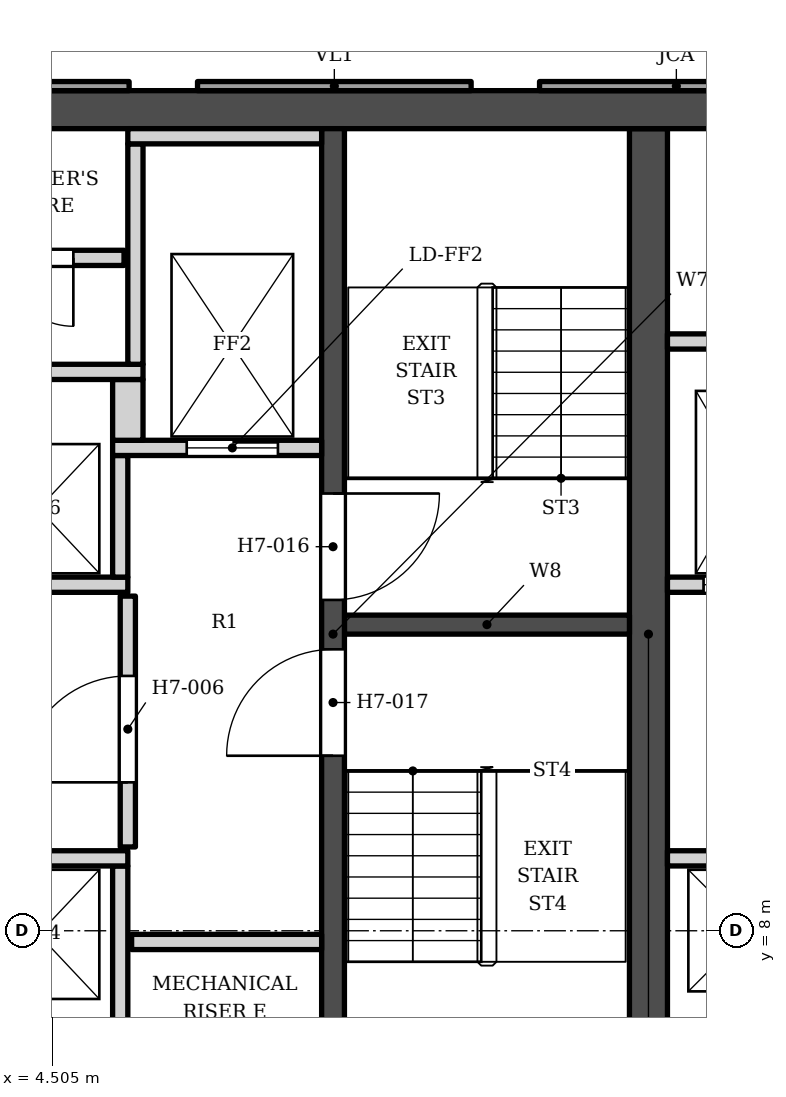
"""IFC4 building model, lengths in metres.
Left out: names, types, materials, properties, quantities, classifications, styles, units other than length and angle.
Written with IfcOpenShell. Run it as: python <this file> out.ifc"""

import sys

from ifc_helpers import new_model, si_unit, direction, frame, frame_2d, origin, place, context, subcontext, project, spatial, polyline, rectangle, outline, extrude, element, fill, save


model = new_model("IFC4")
c1 = context("Model", 3, precision=1e-05, world=origin(), true_north=direction((0.0, 1.0)))
c2 = subcontext(c1, "Body", "Model", "MODEL_VIEW")
j1 = project(units=[si_unit("LENGTHUNIT", "METRE"), si_unit("PLANEANGLEUNIT", "RADIAN")], contexts=[c1])
p1 = place(None, origin())
s1 = spatial("IfcSite", under=j1, at=p1, CompositionType="ELEMENT")
p2 = place(p1, origin())
s2 = spatial("IfcBuilding", under=s1, at=p2, CompositionType="ELEMENT")
p3 = place(p2, frame((0.0, 0.0, 112.2)))
s3 = spatial("IfcBuildingStorey", under=s2, at=p3, CompositionType="ELEMENT", Elevation=112.2)
p4 = place(p3, frame((-16.9, 18.802, 0.0), z_axis=(0.0, 0.0, 1.0), x_axis=(1.0, 0.0, 0.0)))
e1 = element("IfcWall", 1, at=p4, inside=s3, PredefinedType="SHEAR", context=c2, shape_type="SweptSolid", body=[
    extrude(rectangle(XDim=33.8, YDim=0.5, at=frame_2d((16.9, 0.0))), origin(), (0.0, 0.0, 1.0), 3.4),
])
p5 = place(p3, frame((12.35, 5.253, 0.0), z_axis=(0.0, 0.0, 1.0), x_axis=(0.0, 1.0, 0.0)))
e2 = element("IfcWall", 2, at=p5, inside=s3, PredefinedType="SHEAR", context=c2, shape_type="SweptSolid", body=[
    extrude(rectangle(XDim=13.3, YDim=0.5, at=frame_2d((6.65, 0.0))), origin(), (0.0, 0.0, 1.0), 3.4),
])
p6 = place(p3, frame((8.2, 5.253, 0.0), z_axis=(0.0, 0.0, 1.0), x_axis=(0.0, 1.0, 0.0)))
e3 = element("IfcWall", 3, at=p6, inside=s3, PredefinedType="SHEAR", context=c2, shape_type="SweptSolid", body=[
    extrude(rectangle(XDim=13.3, YDim=0.3, at=frame_2d((6.65, 0.0))), origin(), (0.0, 0.0, 1.0), 3.4),
])
p7 = place(p6, frame((7.1, 0.0, 0.0)))
e4 = element("IfcOpeningElement", 4, at=p7, cuts=e3, PredefinedType="OPENING", context=c2, shape_type="SweptSolid", body=[
    extrude(rectangle(XDim=1.4, YDim=2.1, at=frame_2d((0.7, 1.05))), frame((0.0, 0.16, 0.0), z_axis=(0.0, -1.0, 0.0), x_axis=(1.0, 0.0, 0.0)), (0.0, 0.0, 1.0), 0.32),
])
p8 = place(p6, frame((5.05, 0.0, 0.0)))
e5 = element("IfcOpeningElement", 5, at=p8, cuts=e3, PredefinedType="OPENING", context=c2, shape_type="SweptSolid", body=[
    extrude(rectangle(XDim=1.4, YDim=2.1, at=frame_2d((0.7, 1.05))), frame((0.0, 0.16, 0.0), z_axis=(0.0, -1.0, 0.0), x_axis=(1.0, 0.0, 0.0)), (0.0, 0.0, 1.0), 0.32),
])
p9 = place(p3, frame((8.35, 12.028, 0.0), z_axis=(0.0, 0.0, 1.0), x_axis=(1.0, 0.0, 0.0)))
e6 = element("IfcWall", 6, at=p9, inside=s3, PredefinedType="SHEAR", context=c2, shape_type="SweptSolid", body=[
    extrude(rectangle(XDim=3.75, YDim=0.25, at=frame_2d((1.875, 0.0))), origin(), (0.0, 0.0, 1.0), 3.4),
])
p10 = place(p3, origin())
e7 = element("IfcWall", 7, at=p10, inside=s3, PredefinedType="SOLIDWALL", context=c2, shape_type="SweptSolid", body=[
    extrude(outline(polyline([(10.917, 19.173), (10.917, 19.052), (14.517, 19.052), (14.517, 19.173), (10.917, 19.173)])), origin(), (0.0, 0.0, 1.0), 2.65),
])
p11 = place(p3, origin())
e8 = element("IfcWall", 8, at=p11, inside=s3, PredefinedType="ELEMENTEDWALL", context=c2, shape_type="SweptSolid", body=[
    extrude(outline(polyline([(6.417, 19.173), (6.417, 19.052), (10.017, 19.052), (10.017, 19.173), (6.417, 19.173)])), origin(), (0.0, 0.0, 1.0), 2.65),
])
p12 = place(p3, origin())
e9 = element("IfcWall", 9, at=p12, inside=s3, PredefinedType="SOLIDWALL", context=c2, shape_type="SweptSolid", body=[
    extrude(outline(polyline([(1.917, 19.173), (1.917, 19.052), (5.517, 19.052), (5.517, 19.173), (1.917, 19.173)])), origin(), (0.0, 0.0, 1.0), 2.65),
])
for number, where, z_axis, x_axis in (
    (10, (5.4, 6.353, 0.0), (0.0, 0.0, 1.0), (0.0, 1.0, 0.0)),
    (11, (5.55, 7.853, 0.0), (0.0, 0.0, 1.0), (1.0, 0.0, 0.0)),
):
    element("IfcWall", number, at=place(p3, frame(where, z_axis=z_axis, x_axis=x_axis)), inside=s3, PredefinedType="SOLIDWALL", context=c2, shape_type="SweptSolid", body=[
        extrude(rectangle(XDim=2.5, YDim=0.2, at=frame_2d((1.25, 0.0))), origin(), (0.0, 0.0, 1.0), 3.23),
    ])
p13 = place(p3, frame((1.0, 8.953, 0.0), z_axis=(0.0, 0.0, 1.0), x_axis=(1.0, 0.0, 0.0)))
e12 = element("IfcWall", 12, at=p13, inside=s3, PredefinedType="SOLIDWALL", context=c2, shape_type="SweptSolid", body=[
    extrude(rectangle(XDim=4.5, YDim=0.2, at=frame_2d((2.25, 0.0))), origin(), (0.0, 0.0, 1.0), 3.23),
])
p14 = place(p3, frame((12.6, 8.953, 0.0), z_axis=(0.0, 0.0, 1.0), x_axis=(1.0, 0.0, 0.0)))
e13 = element("IfcWall", 13, at=p14, inside=s3, PredefinedType="SOLIDWALL", context=c2, shape_type="SweptSolid", body=[
    extrude(rectangle(XDim=4.3, YDim=0.2, at=frame_2d((2.15, 0.0))), origin(), (0.0, 0.0, 1.0), 3.23),
])
p15 = place(p14, frame((0.525, 0.0, 0.0)))
e14 = element("IfcOpeningElement", 14, at=p15, cuts=e13, PredefinedType="OPENING", context=c2, shape_type="SweptSolid", body=[
    extrude(rectangle(XDim=1.1, YDim=2.1, at=frame_2d((0.55, 1.05))), frame((0.0, 0.11, 0.0), z_axis=(0.0, -1.0, 0.0), x_axis=(1.0, 0.0, 0.0)), (0.0, 0.0, 1.0), 0.22),
])
p16 = place(p14, frame((2.775, 0.0, 0.0)))
e15 = element("IfcOpeningElement", 15, at=p16, cuts=e13, PredefinedType="OPENING", context=c2, shape_type="SweptSolid", body=[
    extrude(rectangle(XDim=1.1, YDim=2.1, at=frame_2d((0.55, 1.05))), frame((0.0, 0.11, 0.0), z_axis=(0.0, -1.0, 0.0), x_axis=(1.0, 0.0, 0.0)), (0.0, 0.0, 1.0), 0.22),
])
p17 = place(p3, frame((5.5, 9.103, 0.0), z_axis=(0.0, 0.0, 1.0), x_axis=(0.0, 1.0, 0.0)))
e16 = element("IfcWall", 16, at=p17, inside=s3, PredefinedType="SOLIDWALL", context=c2, shape_type="SweptSolid", body=[
    extrude(rectangle(XDim=3.3, YDim=0.2, at=frame_2d((1.65, 0.0))), origin(), (0.0, 0.0, 1.0), 3.23),
])
p18 = place(p17, frame((0.85, 0.0, 0.0)))
e17 = element("IfcOpeningElement", 17, at=p18, cuts=e16, PredefinedType="OPENING", context=c2, shape_type="SweptSolid", body=[
    extrude(rectangle(XDim=1.4, YDim=2.1, at=frame_2d((0.7, 1.05))), frame((0.0, 0.11, 0.0), z_axis=(0.0, -1.0, 0.0), x_axis=(1.0, 0.0, 0.0)), (0.0, 0.0, 1.0), 0.22),
])
p19 = place(p3, frame((-1.5, 12.552, 0.0), z_axis=(0.0, 0.0, 1.0), x_axis=(1.0, 0.0, 0.0)))
e18 = element("IfcWall", 18, at=p19, inside=s3, PredefinedType="SOLIDWALL", context=c2, shape_type="SweptSolid", body=[
    extrude(rectangle(XDim=7.0, YDim=0.2, at=frame_2d((3.5, 0.0))), origin(), (0.0, 0.0, 1.0), 3.23),
])
p20 = place(p3, frame((12.6, 12.552, 0.0), z_axis=(0.0, 0.0, 1.0), x_axis=(1.0, 0.0, 0.0)))
e19 = element("IfcWall", 19, at=p20, inside=s3, PredefinedType="SOLIDWALL", context=c2, shape_type="SweptSolid", body=[
    extrude(rectangle(XDim=4.3, YDim=0.2, at=frame_2d((2.15, 0.0))), origin(), (0.0, 0.0, 1.0), 3.23),
])
p21 = place(p20, frame((0.475, 0.0, 0.0)))
e20 = element("IfcOpeningElement", 20, at=p21, cuts=e19, PredefinedType="OPENING", context=c2, shape_type="SweptSolid", body=[
    extrude(rectangle(XDim=1.2, YDim=2.1, at=frame_2d((0.6, 1.05))), frame((0.0, 0.11, 0.0), z_axis=(0.0, -1.0, 0.0), x_axis=(1.0, 0.0, 0.0)), (0.0, 0.0, 1.0), 0.22),
])
p22 = place(p20, frame((2.625, 0.0, 0.0)))
e21 = element("IfcOpeningElement", 21, at=p22, cuts=e19, PredefinedType="OPENING", context=c2, shape_type="SweptSolid", body=[
    extrude(rectangle(XDim=1.4, YDim=2.1, at=frame_2d((0.7, 1.05))), frame((0.0, 0.11, 0.0), z_axis=(0.0, -1.0, 0.0), x_axis=(1.0, 0.0, 0.0)), (0.0, 0.0, 1.0), 0.22),
])
p23 = place(p3, frame((5.4, 12.653, 0.0), z_axis=(0.0, 0.0, 1.0), x_axis=(0.0, 1.0, 0.0)))
e22 = element("IfcWall", 22, at=p23, inside=s3, PredefinedType="SOLIDWALL", context=c2, shape_type="SweptSolid", body=[
    extrude(rectangle(XDim=1.6, YDim=0.2, at=frame_2d((0.8, 0.0))), origin(), (0.0, 0.0, 1.0), 3.23),
])
p24 = place(p3, frame((5.3, 14.353, 0.0), z_axis=(0.0, 0.0, 1.0), x_axis=(1.0, 0.0, 0.0)))
e23 = element("IfcWall", 23, at=p24, inside=s3, PredefinedType="SOLIDWALL", context=c2, shape_type="SweptSolid", body=[
    extrude(rectangle(XDim=2.75, YDim=0.2, at=frame_2d((1.375, 0.0))), origin(), (0.0, 0.0, 1.0), 3.23),
])
p25 = place(p24, frame((0.975, 0.0, 0.0)))
e24 = element("IfcOpeningElement", 24, at=p25, cuts=e23, PredefinedType="OPENING", context=c2, shape_type="SweptSolid", body=[
    extrude(rectangle(XDim=1.2, YDim=2.1, at=frame_2d((0.6, 1.05))), frame((0.0, 0.11, 0.0), z_axis=(0.0, -1.0, 0.0), x_axis=(1.0, 0.0, 0.0)), (0.0, 0.0, 1.0), 0.22),
])
p26 = place(p3, frame((5.5, 14.453, 0.0), z_axis=(0.0, 0.0, 1.0), x_axis=(0.0, 1.0, 0.0)))
e25 = element("IfcWall", 25, at=p26, inside=s3, PredefinedType="SOLIDWALL", context=c2, shape_type="SweptSolid", body=[
    extrude(rectangle(XDim=0.8, YDim=0.4, at=frame_2d((0.4, 0.0))), origin(), (0.0, 0.0, 1.0), 3.23),
])
p27 = place(p3, frame((-1.5, 15.353, 0.0), z_axis=(0.0, 0.0, 1.0), x_axis=(1.0, 0.0, 0.0)))
e26 = element("IfcWall", 26, at=p27, inside=s3, PredefinedType="SOLIDWALL", context=c2, shape_type="SweptSolid", body=[
    extrude(rectangle(XDim=7.2, YDim=0.2, at=frame_2d((3.6, 0.0))), origin(), (0.0, 0.0, 1.0), 3.23),
])
p28 = place(p3, frame((5.6, 15.453, 0.0), z_axis=(0.0, 0.0, 1.0), x_axis=(0.0, 1.0, 0.0)))
e27 = element("IfcWall", 27, at=p28, inside=s3, PredefinedType="SOLIDWALL", context=c2, shape_type="SweptSolid", body=[
    extrude(rectangle(XDim=2.9, YDim=0.2, at=frame_2d((1.45, 0.0))), origin(), (0.0, 0.0, 1.0), 3.23),
])
p29 = place(p3, frame((12.6, 15.753, 0.0), z_axis=(0.0, 0.0, 1.0), x_axis=(1.0, 0.0, 0.0)))
e28 = element("IfcWall", 28, at=p29, inside=s3, PredefinedType="SOLIDWALL", context=c2, shape_type="SweptSolid", body=[
    extrude(rectangle(XDim=4.3, YDim=0.2, at=frame_2d((2.15, 0.0))), origin(), (0.0, 0.0, 1.0), 3.23),
])
p30 = place(p3, frame((-1.6, 16.853, 0.0), z_axis=(0.0, 0.0, 1.0), x_axis=(1.0, 0.0, 0.0)))
e29 = element("IfcWall", 29, at=p30, inside=s3, PredefinedType="SOLIDWALL", context=c2, shape_type="SweptSolid", body=[
    extrude(rectangle(XDim=7.05, YDim=0.2, at=frame_2d((3.525, 0.0))), origin(), (0.0, 0.0, 1.0), 3.23),
])
p31 = place(p30, frame((0.817, 0.0, 0.0)))
e30 = element("IfcOpeningElement", 30, at=p31, cuts=e29, PredefinedType="OPENING", context=c2, shape_type="SweptSolid", body=[
    extrude(rectangle(XDim=0.9, YDim=2.1, at=frame_2d((0.45, 1.05))), frame((0.0, 0.11, 0.0), z_axis=(0.0, -1.0, 0.0), x_axis=(1.0, 0.0, 0.0)), (0.0, 0.0, 1.0), 0.22),
])
p32 = place(p30, frame((3.15, 0.0, 0.0)))
e31 = element("IfcOpeningElement", 31, at=p32, cuts=e29, PredefinedType="OPENING", context=c2, shape_type="SweptSolid", body=[
    extrude(rectangle(XDim=0.9, YDim=2.1, at=frame_2d((0.45, 1.05))), frame((0.0, 0.11, 0.0), z_axis=(0.0, -1.0, 0.0), x_axis=(1.0, 0.0, 0.0)), (0.0, 0.0, 1.0), 0.22),
])
p33 = place(p30, frame((5.483, 0.0, 0.0)))
e32 = element("IfcOpeningElement", 32, at=p33, cuts=e29, PredefinedType="OPENING", context=c2, shape_type="SweptSolid", body=[
    extrude(rectangle(XDim=0.9, YDim=2.1, at=frame_2d((0.45, 1.05))), frame((0.0, 0.11, 0.0), z_axis=(0.0, -1.0, 0.0), x_axis=(1.0, 0.0, 0.0)), (0.0, 0.0, 1.0), 0.22),
])
p34 = place(p3, frame((5.5, 18.453, 0.0), z_axis=(0.0, 0.0, 1.0), x_axis=(1.0, 0.0, 0.0)))
e33 = element("IfcWall", 33, at=p34, inside=s3, PredefinedType="SOLIDWALL", context=c2, shape_type="SweptSolid", body=[
    extrude(rectangle(XDim=2.55, YDim=0.2, at=frame_2d((1.275, 0.0))), origin(), (0.0, 0.0, 1.0), 3.23),
])
p35 = place(p25, origin())
e34 = element("IfcDoor", 34, at=p35, inside=s3, OperationType="DOUBLE_DOOR_SLIDING", PredefinedType="DOOR", context=c2, shape_type="SweptSolid", body=[
    extrude(rectangle(XDim=1.2, YDim=2.1, at=frame_2d((0.6, 1.05))), frame((0.0, 0.025, 0.0), z_axis=(0.0, -1.0, 0.0), x_axis=(1.0, 0.0, 0.0)), (0.0, 0.0, 1.0), 0.05),
])
fill(e24, e34)
p36 = place(p21, origin())
e35 = element("IfcDoor", 35, at=p36, inside=s3, OperationType="DOUBLE_DOOR_SLIDING", PredefinedType="DOOR", context=c2, shape_type="SweptSolid", body=[
    extrude(rectangle(XDim=1.2, YDim=2.1, at=frame_2d((0.6, 1.05))), frame((0.0, 0.025, 0.0), z_axis=(0.0, -1.0, 0.0), x_axis=(1.0, 0.0, 0.0)), (0.0, 0.0, 1.0), 0.05),
])
fill(e20, e35)
p37 = place(p7, origin())
e36 = element("IfcDoor", 36, at=p37, inside=s3, OperationType="SINGLE_SWING_RIGHT", PredefinedType="DOOR", context=c2, shape_type="SweptSolid", body=[
    extrude(rectangle(XDim=1.4, YDim=2.1, at=frame_2d((0.7, 1.05))), frame((0.0, 0.025, 0.0), z_axis=(0.0, -1.0, 0.0), x_axis=(1.0, 0.0, 0.0)), (0.0, 0.0, 1.0), 0.05),
])
fill(e4, e36)
p38 = place(p8, origin())
e37 = element("IfcDoor", 37, at=p38, inside=s3, OperationType="SINGLE_SWING_LEFT", PredefinedType="DOOR", context=c2, shape_type="SweptSolid", body=[
    extrude(rectangle(XDim=1.4, YDim=2.1, at=frame_2d((0.7, 1.05))), frame((0.0, 0.025, 0.0), z_axis=(0.0, -1.0, 0.0), x_axis=(1.0, 0.0, 0.0)), (0.0, 0.0, 1.0), 0.05),
])
fill(e5, e37)
p39 = place(p18, origin())
e38 = element("IfcDoor", 38, at=p39, inside=s3, OperationType="SINGLE_SWING_LEFT", PredefinedType="DOOR", context=c2, shape_type="SweptSolid", body=[
    extrude(rectangle(XDim=1.4, YDim=2.1, at=frame_2d((0.7, 1.05))), frame((0.0, 0.025, 0.0), z_axis=(0.0, -1.0, 0.0), x_axis=(1.0, 0.0, 0.0)), (0.0, 0.0, 1.0), 0.05),
])
fill(e17, e38)
p40 = place(p33, origin())
e39 = element("IfcDoor", 39, at=p40, inside=s3, OperationType="SINGLE_SWING_RIGHT", PredefinedType="DOOR", context=c2, shape_type="SweptSolid", body=[
    extrude(rectangle(XDim=0.9, YDim=2.1, at=frame_2d((0.45, 1.05))), frame((0.0, 0.025, 0.0), z_axis=(0.0, -1.0, 0.0), x_axis=(1.0, 0.0, 0.0)), (0.0, 0.0, 1.0), 0.05),
])
fill(e32, e39)
save(model, sys.argv[1])
